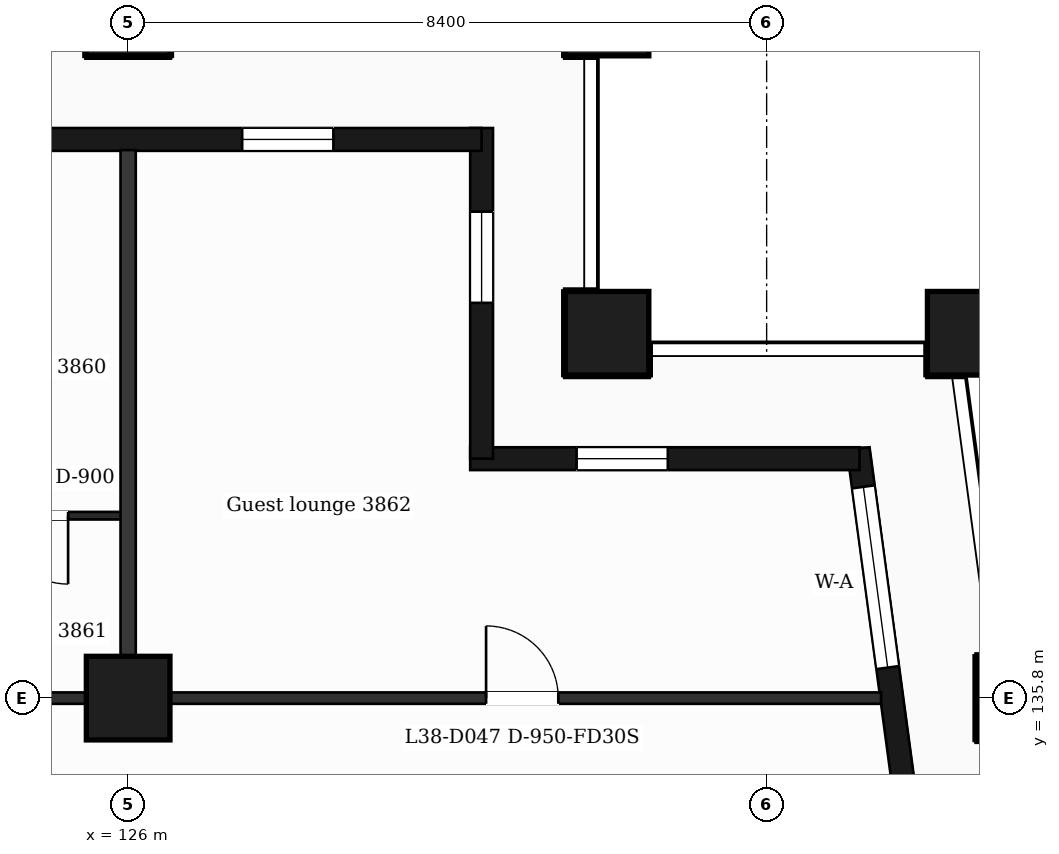
"""IFC4 building model, lengths in metres.
Left out: names, types, materials, properties, quantities, classifications, styles, units other than length and angle.
Written with IfcOpenShell. Run it as: python <this file> out.ifc"""

import sys

from ifc_helpers import new_model, si_unit, direction, frame, frame_2d, origin, origin_2d, place, context, subcontext, project, spatial, rectangle, extrude, element, fill, save


model = new_model("IFC4")
c1 = context("Model", 3, precision=1e-05, world=origin(), true_north=direction((0.0, 1.0)))
c2 = subcontext(c1, "Body", "Model", "MODEL_VIEW")
j1 = project(units=[si_unit("LENGTHUNIT", "METRE"), si_unit("PLANEANGLEUNIT", "RADIAN")], contexts=[c1])
p1 = place(None, origin())
s1 = spatial("IfcSite", under=j1, at=p1, CompositionType="ELEMENT")
p2 = place(p1, origin())
s2 = spatial("IfcBuilding", under=s1, at=p2, CompositionType="ELEMENT")
p3 = place(p2, frame((0.0, 0.0, 162.6)))
s3 = spatial("IfcBuildingStorey", under=s2, at=p3, CompositionType="ELEMENT", Elevation=162.6)
for number, where, z_axis, x_axis in (
    (1, (132.3, 140.6, 0.0), (0.0, 0.0, 1.0), (1.0, 0.0, 0.0)),
    (2, (137.065, 140.6, 0.0), (0.0, 0.0, 1.0), (1.0, 0.0, 0.0)),
    (3, (126.0, 135.8, 0.0), (0.0, 0.0, 1.0), (1.0, 0.0, 0.0)),
    (4, (137.711, 135.8, 0.0), (0.0, 0.0, 1.0), (1.0, 0.0, 0.0)),
    (5, (126.0, 144.8, 0.0), (0.0, 0.0, 1.0), (1.0, 0.0, 0.0)),
    (6, (132.3, 144.8, 0.0), (0.0, 0.0, 1.0), (1.0, 0.0, 0.0)),
):
    element("IfcColumn", number, at=place(p3, frame(where, z_axis=z_axis, x_axis=x_axis)), inside=s3, PredefinedType="COLUMN", context=c2, shape_type="SweptSolid", body=[
        extrude(rectangle(XDim=1.1, YDim=1.1, at=origin_2d()), origin(), (0.0, 0.0, 1.0), 3.7),
    ])
p4 = place(p3, frame((136.504, 132.4, 0.0), z_axis=(0.0, 0.0, 1.0), x_axis=(-0.133399697462, 0.99106231929, 0.0)))
e7 = element("IfcWall", 7, at=p4, inside=s3, PredefinedType="SOLIDWALL", context=c2, shape_type="SweptSolid", body=[
    extrude(rectangle(XDim=6.74, YDim=0.3, at=frame_2d((3.37, 0.0))), origin(), (0.0, 0.0, 1.0), 3.38),
])
p5 = place(p4, frame((1.115, 0.0, 0.0)))
e8 = element("IfcOpeningElement", 8, at=p5, cuts=e7, PredefinedType="OPENING", context=c2, shape_type="SweptSolid", body=[
    extrude(rectangle(XDim=1.2, YDim=2.4, at=frame_2d((0.6, 1.2))), frame((0.0, 0.16, 0.0), z_axis=(0.0, -1.0, 0.0), x_axis=(1.0, 0.0, 0.0)), (0.0, 0.0, 1.0), 0.32),
])
p6 = place(p4, frame((3.835, 0.0, 0.9)))
e9 = element("IfcOpeningElement", 9, at=p6, cuts=e7, PredefinedType="OPENING", context=c2, shape_type="SweptSolid", body=[
    extrude(rectangle(XDim=2.4, YDim=2.1, at=frame_2d((1.2, 1.05))), frame((0.0, 0.16, 0.0), z_axis=(0.0, -1.0, 0.0), x_axis=(1.0, 0.0, 0.0)), (0.0, 0.0, 1.0), 0.32),
])
p7 = place(p3, frame((135.623, 138.95, 0.0), z_axis=(0.0, 0.0, 1.0), x_axis=(-1.0, 0.0, 0.0)))
e10 = element("IfcWall", 10, at=p7, inside=s3, PredefinedType="SOLIDWALL", context=c2, shape_type="SweptSolid", body=[
    extrude(rectangle(XDim=5.123, YDim=0.3, at=frame_2d((2.561, 0.0))), origin(), (0.0, 0.0, 1.0), 3.38),
])
p8 = place(p7, frame((2.523, 0.0, 0.9)))
e11 = element("IfcOpeningElement", 11, at=p8, cuts=e10, PredefinedType="OPENING", context=c2, shape_type="SweptSolid", body=[
    extrude(rectangle(XDim=1.2, YDim=2.1, at=frame_2d((0.6, 1.05))), frame((0.0, 0.16, 0.0), z_axis=(0.0, -1.0, 0.0), x_axis=(1.0, 0.0, 0.0)), (0.0, 0.0, 1.0), 0.32),
])
p9 = place(p3, frame((130.65, 138.95, 0.0), z_axis=(0.0, 0.0, 1.0), x_axis=(0.0, 1.0, 0.0)))
e12 = element("IfcWall", 12, at=p9, inside=s3, PredefinedType="SOLIDWALL", context=c2, shape_type="SweptSolid", body=[
    extrude(rectangle(XDim=4.35, YDim=0.3, at=frame_2d((2.175, 0.0))), origin(), (0.0, 0.0, 1.0), 3.38),
])
p10 = place(p9, frame((2.05, 0.0, 0.9)))
e13 = element("IfcOpeningElement", 13, at=p10, cuts=e12, PredefinedType="OPENING", context=c2, shape_type="SweptSolid", body=[
    extrude(rectangle(XDim=1.2, YDim=2.1, at=frame_2d((0.6, 1.05))), frame((0.0, 0.16, 0.0), z_axis=(0.0, -1.0, 0.0), x_axis=(1.0, 0.0, 0.0)), (0.0, 0.0, 1.0), 0.32),
])
p11 = place(p3, frame((130.65, 143.15, 0.0), z_axis=(0.0, 0.0, 1.0), x_axis=(-1.0, 0.0, 0.0)))
e14 = element("IfcWall", 14, at=p11, inside=s3, PredefinedType="SOLIDWALL", context=c2, shape_type="SweptSolid", body=[
    extrude(rectangle(XDim=16.35, YDim=0.3, at=frame_2d((8.175, 0.0))), origin(), (0.0, 0.0, 1.0), 3.38),
])
p12 = place(p11, frame((1.95, 0.0, 0.9)))
e15 = element("IfcOpeningElement", 15, at=p12, cuts=e14, PredefinedType="OPENING", context=c2, shape_type="SweptSolid", body=[
    extrude(rectangle(XDim=1.2, YDim=2.1, at=frame_2d((0.6, 1.05))), frame((0.0, 0.16, 0.0), z_axis=(0.0, -1.0, 0.0), x_axis=(1.0, 0.0, 0.0)), (0.0, 0.0, 1.0), 0.32),
])
p13 = place(p11, frame((6.15, 0.0, 0.0)))
e16 = element("IfcOpeningElement", 16, at=p13, cuts=e14, PredefinedType="OPENING", context=c2, shape_type="SweptSolid", body=[
    extrude(rectangle(XDim=1.2, YDim=2.4, at=frame_2d((0.6, 1.2))), frame((0.0, 0.16, 0.0), z_axis=(0.0, -1.0, 0.0), x_axis=(1.0, 0.0, 0.0)), (0.0, 0.0, 1.0), 0.32),
])
p14 = place(p11, frame((9.75, 0.0, 0.9)))
e17 = element("IfcOpeningElement", 17, at=p14, cuts=e14, PredefinedType="OPENING", context=c2, shape_type="SweptSolid", body=[
    extrude(rectangle(XDim=2.4, YDim=2.1, at=frame_2d((1.2, 1.05))), frame((0.0, 0.16, 0.0), z_axis=(0.0, -1.0, 0.0), x_axis=(1.0, 0.0, 0.0)), (0.0, 0.0, 1.0), 0.32),
])
p15 = place(p11, frame((13.45, 0.0, 0.9)))
e18 = element("IfcOpeningElement", 18, at=p15, cuts=e14, PredefinedType="OPENING", context=c2, shape_type="SweptSolid", body=[
    extrude(rectangle(XDim=2.4, YDim=2.1, at=frame_2d((1.2, 1.05))), frame((0.0, 0.16, 0.0), z_axis=(0.0, -1.0, 0.0), x_axis=(1.0, 0.0, 0.0)), (0.0, 0.0, 1.0), 0.32),
])
p16 = place(p3, frame((90.895, 135.8, 0.0), z_axis=(0.0, 0.0, 1.0), x_axis=(1.0, 0.0, 0.0)))
e19 = element("IfcWall", 19, at=p16, inside=s3, PredefinedType="PARTITIONING", context=c2, shape_type="SweptSolid", body=[
    extrude(rectangle(XDim=45.011, YDim=0.15, at=frame_2d((22.505, 0.0))), origin(), (0.0, 0.0, 1.0), 3.38),
])
p17 = place(p16, frame((8.005, 0.0, 0.0)))
e20 = element("IfcOpeningElement", 20, at=p17, cuts=e19, PredefinedType="OPENING", context=c2, shape_type="SweptSolid", body=[
    extrude(rectangle(XDim=1.0, YDim=2.1, at=frame_2d((0.5, 1.05))), frame((0.0, 0.085, 0.0), z_axis=(0.0, -1.0, 0.0), x_axis=(1.0, 0.0, 0.0)), (0.0, 0.0, 1.0), 0.17),
])
p18 = place(p16, frame((10.67, 0.0, 0.0)))
e21 = element("IfcOpeningElement", 21, at=p18, cuts=e19, PredefinedType="OPENING", context=c2, shape_type="SweptSolid", body=[
    extrude(rectangle(XDim=0.95, YDim=2.1, at=frame_2d((0.475, 1.05))), frame((0.0, 0.085, 0.0), z_axis=(0.0, -1.0, 0.0), x_axis=(1.0, 0.0, 0.0)), (0.0, 0.0, 1.0), 0.17),
])
p19 = place(p16, frame((16.59, 0.0, 0.0)))
e22 = element("IfcOpeningElement", 22, at=p19, cuts=e19, PredefinedType="OPENING", context=c2, shape_type="SweptSolid", body=[
    extrude(rectangle(XDim=0.95, YDim=2.1, at=frame_2d((0.475, 1.05))), frame((0.0, 0.085, 0.0), z_axis=(0.0, -1.0, 0.0), x_axis=(1.0, 0.0, 0.0)), (0.0, 0.0, 1.0), 0.17),
])
p20 = place(p16, frame((20.98, 0.0, 0.0)))
e23 = element("IfcOpeningElement", 23, at=p20, cuts=e19, PredefinedType="OPENING", context=c2, shape_type="SweptSolid", body=[
    extrude(rectangle(XDim=0.95, YDim=2.1, at=frame_2d((0.475, 1.05))), frame((0.0, 0.085, 0.0), z_axis=(0.0, -1.0, 0.0), x_axis=(1.0, 0.0, 0.0)), (0.0, 0.0, 1.0), 0.17),
])
p21 = place(p16, frame((29.335, 0.0, 0.0)))
e24 = element("IfcOpeningElement", 24, at=p21, cuts=e19, PredefinedType="OPENING", context=c2, shape_type="SweptSolid", body=[
    extrude(rectangle(XDim=0.95, YDim=2.1, at=frame_2d((0.475, 1.05))), frame((0.0, 0.085, 0.0), z_axis=(0.0, -1.0, 0.0), x_axis=(1.0, 0.0, 0.0)), (0.0, 0.0, 1.0), 0.17),
])
p22 = place(p16, frame((31.156, 0.0, 0.0)))
e25 = element("IfcOpeningElement", 25, at=p22, cuts=e19, PredefinedType="OPENING", context=c2, shape_type="SweptSolid", body=[
    extrude(rectangle(XDim=1.0, YDim=2.1, at=frame_2d((0.5, 1.05))), frame((0.0, 0.085, 0.0), z_axis=(0.0, -1.0, 0.0), x_axis=(1.0, 0.0, 0.0)), (0.0, 0.0, 1.0), 0.17),
])
p23 = place(p16, frame((39.814, 0.0, 0.0)))
e26 = element("IfcOpeningElement", 26, at=p23, cuts=e19, PredefinedType="OPENING", context=c2, shape_type="SweptSolid", body=[
    extrude(rectangle(XDim=0.95, YDim=2.1, at=frame_2d((0.475, 1.05))), frame((0.0, 0.085, 0.0), z_axis=(0.0, -1.0, 0.0), x_axis=(1.0, 0.0, 0.0)), (0.0, 0.0, 1.0), 0.17),
])
p24 = place(p3, frame((123.25, 138.2, 0.0), z_axis=(0.0, 0.0, 1.0), x_axis=(1.0, 0.0, 0.0)))
e27 = element("IfcWall", 27, at=p24, inside=s3, PredefinedType="PARTITIONING", context=c2, shape_type="SweptSolid", body=[
    extrude(rectangle(XDim=2.75, YDim=0.1, at=frame_2d((1.375, 0.0))), origin(), (0.0, 0.0, 1.0), 3.38),
])
p25 = place(p24, frame((1.06, 0.0, 0.0)))
e28 = element("IfcOpeningElement", 28, at=p25, cuts=e27, PredefinedType="OPENING", context=c2, shape_type="SweptSolid", body=[
    extrude(rectangle(XDim=0.9, YDim=2.1, at=frame_2d((0.45, 1.05))), frame((0.0, 0.06, 0.0), z_axis=(0.0, -1.0, 0.0), x_axis=(1.0, 0.0, 0.0)), (0.0, 0.0, 1.0), 0.12),
])
p26 = place(p3, frame((126.0, 135.875, 0.0), z_axis=(0.0, 0.0, 1.0), x_axis=(0.0, 1.0, 0.0)))
e29 = element("IfcWall", 29, at=p26, inside=s3, PredefinedType="PARTITIONING", context=c2, shape_type="SweptSolid", body=[
    extrude(rectangle(XDim=7.135, YDim=0.2, at=frame_2d((3.567, 0.0))), origin(), (0.0, 0.0, 1.0), 3.38),
])
p27 = place(p6, origin())
e30 = element("IfcWindow", 30, at=p27, inside=s3, PartitioningType="SINGLE_PANEL", PredefinedType="WINDOW", context=c2, shape_type="SweptSolid", body=[
    extrude(rectangle(XDim=2.4, YDim=2.1, at=frame_2d((1.2, 1.05))), frame((0.0, 0.03, 0.0), z_axis=(0.0, -1.0, 0.0), x_axis=(1.0, 0.0, 0.0)), (0.0, 0.0, 1.0), 0.06),
])
fill(e9, e30)
p28 = place(p8, origin())
e31 = element("IfcWindow", 31, at=p28, inside=s3, PartitioningType="SINGLE_PANEL", PredefinedType="WINDOW", context=c2, shape_type="SweptSolid", body=[
    extrude(rectangle(XDim=1.2, YDim=2.1, at=frame_2d((0.6, 1.05))), frame((0.0, 0.03, 0.0), z_axis=(0.0, -1.0, 0.0), x_axis=(1.0, 0.0, 0.0)), (0.0, 0.0, 1.0), 0.06),
])
fill(e11, e31)
p29 = place(p10, origin())
e32 = element("IfcWindow", 32, at=p29, inside=s3, PartitioningType="SINGLE_PANEL", PredefinedType="WINDOW", context=c2, shape_type="SweptSolid", body=[
    extrude(rectangle(XDim=1.2, YDim=2.1, at=frame_2d((0.6, 1.05))), frame((0.0, 0.03, 0.0), z_axis=(0.0, -1.0, 0.0), x_axis=(1.0, 0.0, 0.0)), (0.0, 0.0, 1.0), 0.06),
])
fill(e13, e32)
p30 = place(p12, origin())
e33 = element("IfcWindow", 33, at=p30, inside=s3, PartitioningType="SINGLE_PANEL", PredefinedType="WINDOW", context=c2, shape_type="SweptSolid", body=[
    extrude(rectangle(XDim=1.2, YDim=2.1, at=frame_2d((0.6, 1.05))), frame((0.0, 0.03, 0.0), z_axis=(0.0, -1.0, 0.0), x_axis=(1.0, 0.0, 0.0)), (0.0, 0.0, 1.0), 0.06),
])
fill(e15, e33)
p31 = place(p25, origin())
e34 = element("IfcDoor", 34, at=p31, inside=s3, OperationType="SINGLE_SWING_RIGHT", PredefinedType="DOOR", context=c2, shape_type="SweptSolid", body=[
    extrude(rectangle(XDim=0.9, YDim=2.1, at=frame_2d((0.45, 1.05))), frame((0.0, 0.025, 0.0), z_axis=(0.0, -1.0, 0.0), x_axis=(1.0, 0.0, 0.0)), (0.0, 0.0, 1.0), 0.05),
])
fill(e28, e34)
p32 = place(p23, origin())
e35 = element("IfcDoor", 35, at=p32, inside=s3, OperationType="SINGLE_SWING_LEFT", PredefinedType="DOOR", context=c2, shape_type="SweptSolid", body=[
    extrude(rectangle(XDim=0.95, YDim=2.1, at=frame_2d((0.475, 1.05))), frame((0.0, 0.025, 0.0), z_axis=(0.0, -1.0, 0.0), x_axis=(1.0, 0.0, 0.0)), (0.0, 0.0, 1.0), 0.05),
])
fill(e26, e35)
save(model, sys.argv[1])
